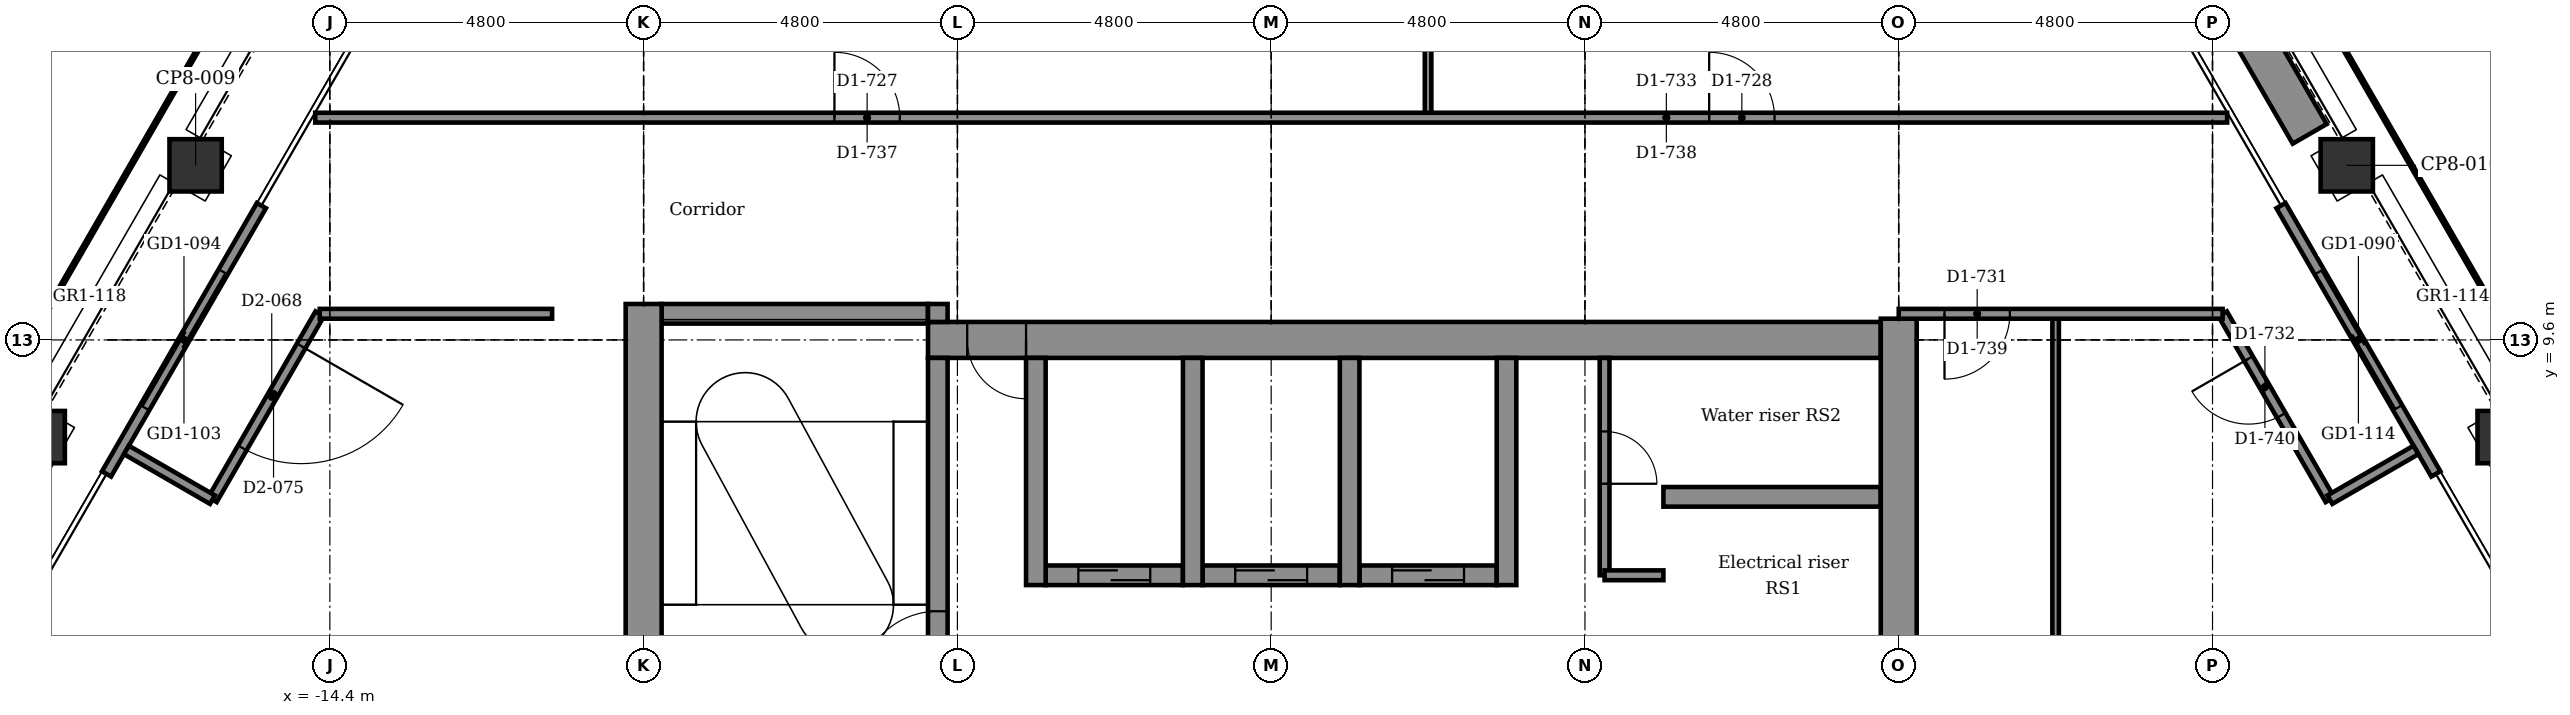
"""IFC4 building model, lengths in metres.
Left out: names, types, materials, properties, quantities, classifications, styles, units other than length and angle.
Written with IfcOpenShell. Run it as: python <this file> out.ifc"""

import sys

from ifc_helpers import new_model, si_unit, direction, frame, frame_2d, origin, origin_2d, place, context, subcontext, project, spatial, rectangle, extrude, element, fill, save


model = new_model("IFC4")
c1 = context("Model", 3, precision=1e-05, world=origin(), true_north=direction((0.0, 1.0)))
c2 = subcontext(c1, "Body", "Model", "MODEL_VIEW")
j1 = project(units=[si_unit("LENGTHUNIT", "METRE"), si_unit("PLANEANGLEUNIT", "RADIAN")], contexts=[c1])
p1 = place(None, origin())
s1 = spatial("IfcSite", under=j1, at=p1, CompositionType="ELEMENT")
p2 = place(p1, origin())
s2 = spatial("IfcBuilding", under=s1, at=p2, CompositionType="ELEMENT")
p3 = place(p2, frame((0.0, 0.0, 273.5)))
s3 = spatial("IfcBuildingStorey", under=s2, at=p3, CompositionType="ELEMENT", Elevation=273.5)
for number, where, z_axis, x_axis in (
    (1, (16.454, 12.271, -0.15), (0.0, 0.0, 1.0), (0.866, 0.5, 0.0)),
    (2, (18.854, 8.114, -0.15), (0.0, 0.0, 1.0), (0.866, 0.5, 0.0)),
    (3, (-18.854, 8.114, -0.15), (0.0, 0.0, 1.0), (0.5, 0.866, 0.0)),
    (4, (-16.454, 12.271, -0.15), (0.0, 0.0, 1.0), (0.5, 0.866, 0.0)),
):
    element("IfcColumn", number, at=place(p3, frame(where, z_axis=z_axis, x_axis=x_axis)), inside=s3, PredefinedType="COLUMN", context=c2, shape_type="SweptSolid", body=[
        extrude(rectangle(XDim=0.8, YDim=0.8, at=origin_2d()), origin(), (0.0, 0.0, 1.0), 3.9),
    ])
p4 = place(p3, frame((-3.45, 6.0, -0.15), z_axis=(0.0, 0.0, 1.0), x_axis=(1.0, 0.0, 0.0)))
e5 = element("IfcWall", 5, at=p4, inside=s3, PredefinedType="STANDARD", context=c2, shape_type="SweptSolid", body=[
    extrude(rectangle(XDim=2.1, YDim=0.3, at=frame_2d((1.05, 0.0))), origin(), (0.0, 0.0, 1.0), 3.9),
])
p5 = place(p4, frame((0.5, 0.0, 0.15)))
e6 = element("IfcOpeningElement", 6, at=p5, cuts=e5, PredefinedType="OPENING", context=c2, shape_type="SweptSolid", body=[
    extrude(rectangle(XDim=1.1, YDim=2.1, at=frame_2d((0.55, 1.05))), frame((0.0, 0.16, 0.0), z_axis=(0.0, -1.0, 0.0), x_axis=(1.0, 0.0, 0.0)), (0.0, 0.0, 1.0), 0.32),
])
p6 = place(p3, frame((-1.05, 6.0, -0.15), z_axis=(0.0, 0.0, 1.0), x_axis=(1.0, 0.0, 0.0)))
e7 = element("IfcWall", 7, at=p6, inside=s3, PredefinedType="STANDARD", context=c2, shape_type="SweptSolid", body=[
    extrude(rectangle(XDim=2.1, YDim=0.3, at=frame_2d((1.05, 0.0))), origin(), (0.0, 0.0, 1.0), 3.9),
])
p7 = place(p6, frame((0.5, 0.0, 0.15)))
e8 = element("IfcOpeningElement", 8, at=p7, cuts=e7, PredefinedType="OPENING", context=c2, shape_type="SweptSolid", body=[
    extrude(rectangle(XDim=1.1, YDim=2.1, at=frame_2d((0.55, 1.05))), frame((0.0, 0.16, 0.0), z_axis=(0.0, -1.0, 0.0), x_axis=(1.0, 0.0, 0.0)), (0.0, 0.0, 1.0), 0.32),
])
p8 = place(p3, frame((1.35, 6.0, -0.15), z_axis=(0.0, 0.0, 1.0), x_axis=(1.0, 0.0, 0.0)))
e9 = element("IfcWall", 9, at=p8, inside=s3, PredefinedType="STANDARD", context=c2, shape_type="SweptSolid", body=[
    extrude(rectangle(XDim=2.1, YDim=0.3, at=frame_2d((1.05, 0.0))), origin(), (0.0, 0.0, 1.0), 3.9),
])
p9 = place(p8, frame((0.5, 0.0, 0.15)))
e10 = element("IfcOpeningElement", 10, at=p9, cuts=e9, PredefinedType="OPENING", context=c2, shape_type="SweptSolid", body=[
    extrude(rectangle(XDim=1.1, YDim=2.1, at=frame_2d((0.55, 1.05))), frame((0.0, 0.16, 0.0), z_axis=(0.0, -1.0, 0.0), x_axis=(1.0, 0.0, 0.0)), (0.0, 0.0, 1.0), 0.32),
])
p10 = place(p3, frame((6.0, 7.2, -0.15), z_axis=(0.0, 0.0, 1.0), x_axis=(1.0, 0.0, 0.0)))
e11 = element("IfcWall", 11, at=p10, inside=s3, PredefinedType="STANDARD", context=c2, shape_type="SweptSolid", body=[
    extrude(rectangle(XDim=3.325, YDim=0.3, at=frame_2d((1.663, 0.0))), origin(), (0.0, 0.0, 1.0), 3.9),
])
p11 = place(p3, frame((-5.25, 9.6, -0.15), z_axis=(0.0, 0.0, 1.0), x_axis=(1.0, 0.0, 0.0)))
e12 = element("IfcWall", 12, at=p11, inside=s3, PredefinedType="SHEAR", context=c2, shape_type="SweptSolid", body=[
    extrude(rectangle(XDim=14.575, YDim=0.55, at=frame_2d((7.288, 0.0))), origin(), (0.0, 0.0, 1.0), 3.9),
])
p12 = place(p11, frame((0.6, 0.0, 0.15)))
e13 = element("IfcOpeningElement", 13, at=p12, cuts=e12, PredefinedType="OPENING", context=c2, shape_type="SweptSolid", body=[
    extrude(rectangle(XDim=0.9, YDim=2.1, at=frame_2d((0.45, 1.05))), frame((0.0, 0.285, 0.0), z_axis=(0.0, -1.0, 0.0), x_axis=(1.0, 0.0, 0.0)), (0.0, 0.0, 1.0), 0.57),
])
p13 = place(p3, frame((-9.325, 10.0, -0.15), z_axis=(0.0, 0.0, 1.0), x_axis=(1.0, 0.0, 0.0)))
e14 = element("IfcWall", 14, at=p13, inside=s3, PredefinedType="STANDARD", context=c2, shape_type="SweptSolid", body=[
    extrude(rectangle(XDim=4.075, YDim=0.3, at=frame_2d((2.038, 0.0))), origin(), (0.0, 0.0, 1.0), 3.9),
])
p14 = place(p3, frame((-9.6, 2.55, -0.15), z_axis=(0.0, 0.0, 1.0), x_axis=(0.0, 1.0, 0.0)))
e15 = element("IfcWall", 15, at=p14, inside=s3, PredefinedType="SHEAR", context=c2, shape_type="SweptSolid", body=[
    extrude(rectangle(XDim=7.6, YDim=0.55, at=frame_2d((3.8, 0.0))), origin(), (0.0, 0.0, 1.0), 3.9),
])
p15 = place(p3, frame((-5.1, 2.25, -0.15), z_axis=(0.0, 0.0, 1.0), x_axis=(0.0, 1.0, 0.0)))
e16 = element("IfcWall", 16, at=p15, inside=s3, PredefinedType="STANDARD", context=c2, shape_type="SweptSolid", body=[
    extrude(rectangle(XDim=7.075, YDim=0.3, at=frame_2d((3.538, 0.0))), origin(), (0.0, 0.0, 1.0), 3.9),
])
p16 = place(p15, frame((2.0, 0.0, 0.15)))
e17 = element("IfcOpeningElement", 17, at=p16, cuts=e16, PredefinedType="OPENING", context=c2, shape_type="SweptSolid", body=[
    extrude(rectangle(XDim=1.2, YDim=2.1, at=frame_2d((0.6, 1.05))), frame((0.0, 0.16, 0.0), z_axis=(0.0, -1.0, 0.0), x_axis=(1.0, 0.0, 0.0)), (0.0, 0.0, 1.0), 0.32),
])
p17 = place(p3, frame((-5.1, 9.875, -0.15), z_axis=(0.0, 0.0, 1.0), x_axis=(0.0, 1.0, 0.0)))
e18 = element("IfcWall", 18, at=p17, inside=s3, PredefinedType="STANDARD", context=c2, shape_type="SweptSolid", body=[
    extrude(rectangle(XDim=0.275, YDim=0.3, at=frame_2d((0.137, 0.0))), origin(), (0.0, 0.0, 1.0), 3.9),
])
for number, where, z_axis, x_axis in (
    (19, (-3.6, 5.85, -0.15), (0.0, 0.0, 1.0), (0.0, 1.0, 0.0)),
    (20, (-1.2, 5.85, -0.15), (0.0, 0.0, 1.0), (0.0, 1.0, 0.0)),
    (21, (1.2, 5.85, -0.15), (0.0, 0.0, 1.0), (0.0, 1.0, 0.0)),
    (22, (3.6, 5.85, -0.15), (0.0, 0.0, 1.0), (0.0, 1.0, 0.0)),
):
    element("IfcWall", number, at=place(p3, frame(where, z_axis=z_axis, x_axis=x_axis)), inside=s3, PredefinedType="STANDARD", context=c2, shape_type="SweptSolid", body=[
        extrude(rectangle(XDim=3.475, YDim=0.3, at=frame_2d((1.737, 0.0))), origin(), (0.0, 0.0, 1.0), 3.9),
    ])
p18 = place(p3, frame((9.6, -10.15, -0.15), z_axis=(0.0, 0.0, 1.0), x_axis=(0.0, 1.0, 0.0)))
e23 = element("IfcWall", 23, at=p18, inside=s3, PredefinedType="SHEAR", context=c2, shape_type="SweptSolid", body=[
    extrude(rectangle(XDim=20.075, YDim=0.55, at=frame_2d((10.038, 0.0))), origin(), (0.0, 0.0, 1.0), 3.9),
])
p19 = place(p3, frame((15.447, 11.655, 0.0), z_axis=(0.0, 0.0, 1.0), x_axis=(0.499978080042, -0.866038058908, 0.0)))
e24 = element("IfcWall", 24, at=p19, inside=s3, PredefinedType="PARTITIONING", context=c2, shape_type="SweptSolid", body=[
    extrude(rectangle(XDim=4.74, YDim=0.16, at=frame_2d((2.37, 0.0))), origin(), (0.0, 0.0, 1.0), 3.75),
])
p20 = place(p19, frame((1.17, 0.0, 0.0)))
e25 = element("IfcOpeningElement", 25, at=p20, cuts=e24, PredefinedType="OPENING", context=c2, shape_type="SweptSolid", body=[
    extrude(rectangle(XDim=2.4, YDim=2.4, at=frame_2d((1.2, 1.2))), frame((0.0, 0.09, 0.0), z_axis=(0.0, -1.0, 0.0), x_axis=(1.0, 0.0, 0.0)), (0.0, 0.0, 1.0), 0.18),
])
p21 = place(p3, frame((-17.817, 7.55, 0.0), z_axis=(0.0, 0.0, 1.0), x_axis=(0.499978080042, 0.866038058908, 0.0)))
e26 = element("IfcWall", 26, at=p21, inside=s3, PredefinedType="PARTITIONING", context=c2, shape_type="SweptSolid", body=[
    extrude(rectangle(XDim=4.74, YDim=0.16, at=frame_2d((2.37, 0.0))), origin(), (0.0, 0.0, 1.0), 3.75),
])
p22 = place(p21, frame((1.17, 0.0, 0.0)))
e27 = element("IfcOpeningElement", 27, at=p22, cuts=e26, PredefinedType="OPENING", context=c2, shape_type="SweptSolid", body=[
    extrude(rectangle(XDim=2.4, YDim=2.4, at=frame_2d((1.2, 1.2))), frame((0.0, 0.09, 0.0), z_axis=(0.0, -1.0, 0.0), x_axis=(1.0, 0.0, 0.0)), (0.0, 0.0, 1.0), 0.18),
])
p23 = place(p3, frame((14.187, 15.697, 0.0), z_axis=(0.0, 0.0, 1.0), x_axis=(0.499977295307, -0.866038511948, 0.0)))
e28 = element("IfcWall", 28, at=p23, inside=s3, PredefinedType="USERDEFINED", context=c2, shape_type="SweptSolid", body=[
    extrude(rectangle(XDim=3.4, YDim=0.6, at=frame_2d((1.7, 0.0))), origin(), (0.0, 0.0, 1.0), 0.7),
])
p24 = place(p3, frame((12.0, -10.0, 0.0), z_axis=(0.0, 0.0, 1.0), x_axis=(0.0, 1.0, 0.0)))
e29 = element("IfcWall", 29, at=p24, inside=s3, PredefinedType="PARTITIONING", context=c2, shape_type="SweptSolid", body=[
    extrude(rectangle(XDim=20.0, YDim=0.1, at=frame_2d((10.0, 0.0))), origin(), (0.0, 0.0, 1.0), 3.75),
])
p25 = place(p3, frame((5.1, 6.0, 0.0), z_axis=(0.0, 0.0, 1.0), x_axis=(0.0, 1.0, 0.0)))
e30 = element("IfcWall", 30, at=p25, inside=s3, PredefinedType="PARTITIONING", context=c2, shape_type="SweptSolid", body=[
    extrude(rectangle(XDim=3.325, YDim=0.15, at=frame_2d((1.663, 0.0))), origin(), (0.0, 0.0, 1.0), 3.75),
])
p26 = place(p25, frame((1.4, 0.0, 0.0)))
e31 = element("IfcOpeningElement", 31, at=p26, cuts=e30, PredefinedType="OPENING", context=c2, shape_type="SweptSolid", body=[
    extrude(rectangle(XDim=0.8, YDim=2.1, at=frame_2d((0.4, 1.05))), frame((0.0, 0.085, 0.0), z_axis=(0.0, -1.0, 0.0), x_axis=(1.0, 0.0, 0.0)), (0.0, 0.0, 1.0), 0.17),
])
p27 = place(p3, frame((2.4, 13.0, 0.0), z_axis=(0.0, 0.0, 1.0), x_axis=(0.0, 1.0, 0.0)))
e32 = element("IfcWall", 32, at=p27, inside=s3, PredefinedType="PARTITIONING", context=c2, shape_type="SweptSolid", body=[
    extrude(rectangle(XDim=6.125, YDim=0.1, at=frame_2d((3.062, 0.0))), origin(), (0.0, 0.0, 1.0), 3.75),
])
p28 = place(p3, frame((14.555, 10.0, 0.0), z_axis=(0.0, 0.0, 1.0), x_axis=(0.499954196102, -0.866051847062, 0.0)))
e33 = element("IfcWall", 33, at=p28, inside=s3, PredefinedType="PARTITIONING", context=c2, shape_type="SweptSolid", body=[
    extrude(rectangle(XDim=3.283, YDim=0.15, at=frame_2d((1.642, 0.0))), origin(), (0.0, 0.0, 1.0), 3.75),
])
p29 = place(p28, frame((0.794, 0.0, 0.0)))
e34 = element("IfcOpeningElement", 34, at=p29, cuts=e33, PredefinedType="OPENING", context=c2, shape_type="SweptSolid", body=[
    extrude(rectangle(XDim=1.0, YDim=2.1, at=frame_2d((0.5, 1.05))), frame((0.0, 0.085, 0.0), z_axis=(0.0, -1.0, 0.0), x_axis=(1.0, 0.0, 0.0)), (0.0, 0.0, 1.0), 0.17),
])
p30 = place(p3, frame((-16.196, 7.157, 0.0), z_axis=(0.0, 0.0, 1.0), x_axis=(0.499954196102, 0.866051847062, 0.0)))
e35 = element("IfcWall", 35, at=p30, inside=s3, PredefinedType="PARTITIONING", context=c2, shape_type="SweptSolid", body=[
    extrude(rectangle(XDim=3.283, YDim=0.15, at=frame_2d((1.642, 0.0))), origin(), (0.0, 0.0, 1.0), 3.75),
])
p31 = place(p30, frame((0.914, 0.0, 0.0)))
e36 = element("IfcOpeningElement", 36, at=p31, cuts=e35, PredefinedType="OPENING", context=c2, shape_type="SweptSolid", body=[
    extrude(rectangle(XDim=1.8, YDim=2.1, at=frame_2d((0.9, 1.05))), frame((0.0, 0.085, 0.0), z_axis=(0.0, -1.0, 0.0), x_axis=(1.0, 0.0, 0.0)), (0.0, 0.0, 1.0), 0.17),
])
for number, where, z_axis, x_axis in (
    (37, (-17.512, 7.917, 0.0), (0.0, 0.0, 1.0), (0.866, -0.5, 0.0)),
    (38, (16.196, 7.157, 0.0), (0.0, 0.0, 1.0), (0.866, 0.5, 0.0)),
):
    element("IfcWall", number, at=place(p3, frame(where, z_axis=z_axis, x_axis=x_axis)), inside=s3, PredefinedType="PARTITIONING", context=c2, shape_type="SweptSolid", body=[
        extrude(rectangle(XDim=1.52, YDim=0.15, at=frame_2d((0.76, 0.0))), origin(), (0.0, 0.0, 1.0), 3.75),
    ])
p32 = place(p3, frame((5.1, 6.0, 0.0), z_axis=(0.0, 0.0, 1.0), x_axis=(1.0, 0.0, 0.0)))
e39 = element("IfcWall", 39, at=p32, inside=s3, PredefinedType="PARTITIONING", context=c2, shape_type="SweptSolid", body=[
    extrude(rectangle(XDim=0.9, YDim=0.15, at=frame_2d((0.45, 0.0))), origin(), (0.0, 0.0, 1.0), 3.75),
])
p33 = place(p3, frame((-14.555, 10.0, 0.0), z_axis=(0.0, 0.0, 1.0), x_axis=(1.0, 0.0, 0.0)))
e40 = element("IfcWall", 40, at=p33, inside=s3, PredefinedType="PARTITIONING", context=c2, shape_type="SweptSolid", body=[
    extrude(rectangle(XDim=3.555, YDim=0.15, at=frame_2d((1.777, 0.0))), origin(), (0.0, 0.0, 1.0), 3.75),
])
p34 = place(p3, frame((9.6, 10.0, 0.0), z_axis=(0.0, 0.0, 1.0), x_axis=(1.0, 0.0, 0.0)))
e41 = element("IfcWall", 41, at=p34, inside=s3, PredefinedType="PARTITIONING", context=c2, shape_type="SweptSolid", body=[
    extrude(rectangle(XDim=4.955, YDim=0.15, at=frame_2d((2.477, 0.0))), origin(), (0.0, 0.0, 1.0), 3.75),
])
p35 = place(p34, frame((0.7, 0.0, 0.0)))
e42 = element("IfcOpeningElement", 42, at=p35, cuts=e41, PredefinedType="OPENING", context=c2, shape_type="SweptSolid", body=[
    extrude(rectangle(XDim=1.0, YDim=2.1, at=frame_2d((0.5, 1.05))), frame((0.0, 0.085, 0.0), z_axis=(0.0, -1.0, 0.0), x_axis=(1.0, 0.0, 0.0)), (0.0, 0.0, 1.0), 0.17),
])
p36 = place(p3, frame((-14.624, 13.0, 0.0), z_axis=(0.0, 0.0, 1.0), x_axis=(1.0, 0.0, 0.0)))
e43 = element("IfcWall", 43, at=p36, inside=s3, PredefinedType="PARTITIONING", context=c2, shape_type="SweptSolid", body=[
    extrude(rectangle(XDim=29.248, YDim=0.15, at=frame_2d((14.624, 0.0))), origin(), (0.0, 0.0, 1.0), 3.75),
])
p37 = place(p36, frame((7.943, 0.0, 0.0)))
e44 = element("IfcOpeningElement", 44, at=p37, cuts=e43, PredefinedType="OPENING", context=c2, shape_type="SweptSolid", body=[
    extrude(rectangle(XDim=1.0, YDim=2.1, at=frame_2d((0.5, 1.05))), frame((0.0, 0.085, 0.0), z_axis=(0.0, -1.0, 0.0), x_axis=(1.0, 0.0, 0.0)), (0.0, 0.0, 1.0), 0.17),
])
p38 = place(p36, frame((21.324, 0.0, 0.0)))
e45 = element("IfcOpeningElement", 45, at=p38, cuts=e43, PredefinedType="OPENING", context=c2, shape_type="SweptSolid", body=[
    extrude(rectangle(XDim=1.0, YDim=2.1, at=frame_2d((0.5, 1.05))), frame((0.0, 0.085, 0.0), z_axis=(0.0, -1.0, 0.0), x_axis=(1.0, 0.0, 0.0)), (0.0, 0.0, 1.0), 0.17),
])
p39 = place(p20, origin())
e46 = element("IfcDoor", 46, at=p39, inside=s3, OperationType="DOUBLE_DOOR_SLIDING", PredefinedType="DOOR", context=c2, shape_type="SweptSolid", body=[
    extrude(rectangle(XDim=2.4, YDim=2.4, at=frame_2d((1.2, 1.2))), frame((0.0, 0.025, 0.0), z_axis=(0.0, -1.0, 0.0), x_axis=(1.0, 0.0, 0.0)), (0.0, 0.0, 1.0), 0.05),
])
fill(e25, e46)
p40 = place(p22, origin())
e47 = element("IfcDoor", 47, at=p40, inside=s3, OperationType="DOUBLE_DOOR_SLIDING", PredefinedType="DOOR", context=c2, shape_type="SweptSolid", body=[
    extrude(rectangle(XDim=2.4, YDim=2.4, at=frame_2d((1.2, 1.2))), frame((0.0, 0.025, 0.0), z_axis=(0.0, -1.0, 0.0), x_axis=(1.0, 0.0, 0.0)), (0.0, 0.0, 1.0), 0.05),
])
fill(e27, e47)
p41 = place(p26, frame((0.8, 0.0, 0.0), z_axis=(0.0, 0.0, 1.0), x_axis=(-1.0, 0.0, 0.0)))
e48 = element("IfcDoor", 48, at=p41, inside=s3, OperationType="SINGLE_SWING_LEFT", PredefinedType="DOOR", context=c2, shape_type="SweptSolid", body=[
    extrude(rectangle(XDim=0.8, YDim=2.1, at=frame_2d((0.4, 1.05))), frame((0.0, 0.025, 0.0), z_axis=(0.0, -1.0, 0.0), x_axis=(1.0, 0.0, 0.0)), (0.0, 0.0, 1.0), 0.05),
])
fill(e31, e48)
p42 = place(p37, origin())
e49 = element("IfcDoor", 49, at=p42, inside=s3, OperationType="SINGLE_SWING_LEFT", PredefinedType="DOOR", context=c2, shape_type="SweptSolid", body=[
    extrude(rectangle(XDim=1.0, YDim=2.1, at=frame_2d((0.5, 1.05))), frame((0.0, 0.025, 0.0), z_axis=(0.0, -1.0, 0.0), x_axis=(1.0, 0.0, 0.0)), (0.0, 0.0, 1.0), 0.05),
])
fill(e44, e49)
p43 = place(p38, origin())
e50 = element("IfcDoor", 50, at=p43, inside=s3, OperationType="SINGLE_SWING_LEFT", PredefinedType="DOOR", context=c2, shape_type="SweptSolid", body=[
    extrude(rectangle(XDim=1.0, YDim=2.1, at=frame_2d((0.5, 1.05))), frame((0.0, 0.025, 0.0), z_axis=(0.0, -1.0, 0.0), x_axis=(1.0, 0.0, 0.0)), (0.0, 0.0, 1.0), 0.05),
])
fill(e45, e50)
p44 = place(p35, frame((1.0, 0.0, 0.0), z_axis=(0.0, 0.0, 1.0), x_axis=(-1.0, 0.0, 0.0)))
e51 = element("IfcDoor", 51, at=p44, inside=s3, OperationType="SINGLE_SWING_LEFT", PredefinedType="DOOR", context=c2, shape_type="SweptSolid", body=[
    extrude(rectangle(XDim=1.0, YDim=2.1, at=frame_2d((0.5, 1.05))), frame((0.0, 0.025, 0.0), z_axis=(0.0, -1.0, 0.0), x_axis=(1.0, 0.0, 0.0)), (0.0, 0.0, 1.0), 0.05),
])
fill(e42, e51)
p45 = place(p29, frame((1.0, 0.0, 0.0), z_axis=(0.0, 0.0, 1.0), x_axis=(-1.0, 0.0, 0.0)))
e52 = element("IfcDoor", 52, at=p45, inside=s3, OperationType="SINGLE_SWING_LEFT", PredefinedType="DOOR", context=c2, shape_type="SweptSolid", body=[
    extrude(rectangle(XDim=1.0, YDim=2.1, at=frame_2d((0.5, 1.05))), frame((0.0, 0.025, 0.0), z_axis=(0.0, -1.0, 0.0), x_axis=(1.0, 0.0, 0.0)), (0.0, 0.0, 1.0), 0.05),
])
fill(e34, e52)
p46 = place(p31, frame((1.8, 0.0, 0.0), z_axis=(0.0, 0.0, 1.0), x_axis=(-1.0, 0.0, 0.0)))
e53 = element("IfcDoor", 53, at=p46, inside=s3, OperationType="SINGLE_SWING_RIGHT", PredefinedType="DOOR", context=c2, shape_type="SweptSolid", body=[
    extrude(rectangle(XDim=1.8, YDim=2.1, at=frame_2d((0.9, 1.05))), frame((0.0, 0.025, 0.0), z_axis=(0.0, -1.0, 0.0), x_axis=(1.0, 0.0, 0.0)), (0.0, 0.0, 1.0), 0.05),
])
fill(e36, e53)
p47 = place(p5, origin())
e54 = element("IfcDoor", 54, at=p47, inside=s3, OperationType="DOUBLE_DOOR_SLIDING", PredefinedType="DOOR", context=c2, shape_type="SweptSolid", body=[
    extrude(rectangle(XDim=1.1, YDim=2.1, at=frame_2d((0.55, 1.05))), frame((0.0, 0.025, 0.0), z_axis=(0.0, -1.0, 0.0), x_axis=(1.0, 0.0, 0.0)), (0.0, 0.0, 1.0), 0.05),
])
fill(e6, e54)
p48 = place(p7, origin())
e55 = element("IfcDoor", 55, at=p48, inside=s3, OperationType="DOUBLE_DOOR_SLIDING", PredefinedType="DOOR", context=c2, shape_type="SweptSolid", body=[
    extrude(rectangle(XDim=1.1, YDim=2.1, at=frame_2d((0.55, 1.05))), frame((0.0, 0.025, 0.0), z_axis=(0.0, -1.0, 0.0), x_axis=(1.0, 0.0, 0.0)), (0.0, 0.0, 1.0), 0.05),
])
fill(e8, e55)
p49 = place(p9, origin())
e56 = element("IfcDoor", 56, at=p49, inside=s3, OperationType="DOUBLE_DOOR_SLIDING", PredefinedType="DOOR", context=c2, shape_type="SweptSolid", body=[
    extrude(rectangle(XDim=1.1, YDim=2.1, at=frame_2d((0.55, 1.05))), frame((0.0, 0.025, 0.0), z_axis=(0.0, -1.0, 0.0), x_axis=(1.0, 0.0, 0.0)), (0.0, 0.0, 1.0), 0.05),
])
fill(e10, e56)
p50 = place(p16, origin())
e57 = element("IfcDoor", 57, at=p50, inside=s3, OperationType="SINGLE_SWING_LEFT", PredefinedType="DOOR", context=c2, shape_type="SweptSolid", body=[
    extrude(rectangle(XDim=1.2, YDim=2.1, at=frame_2d((0.6, 1.05))), frame((0.0, 0.025, 0.0), z_axis=(0.0, -1.0, 0.0), x_axis=(1.0, 0.0, 0.0)), (0.0, 0.0, 1.0), 0.05),
])
fill(e17, e57)
p51 = place(p12, frame((0.9, 0.0, 0.0), z_axis=(0.0, 0.0, 1.0), x_axis=(-1.0, 0.0, 0.0)))
e58 = element("IfcDoor", 58, at=p51, inside=s3, OperationType="SINGLE_SWING_RIGHT", PredefinedType="DOOR", context=c2, shape_type="SweptSolid", body=[
    extrude(rectangle(XDim=0.9, YDim=2.1, at=frame_2d((0.45, 1.05))), frame((0.0, 0.025, 0.0), z_axis=(0.0, -1.0, 0.0), x_axis=(1.0, 0.0, 0.0)), (0.0, 0.0, 1.0), 0.05),
])
fill(e13, e58)
save(model, sys.argv[1])
